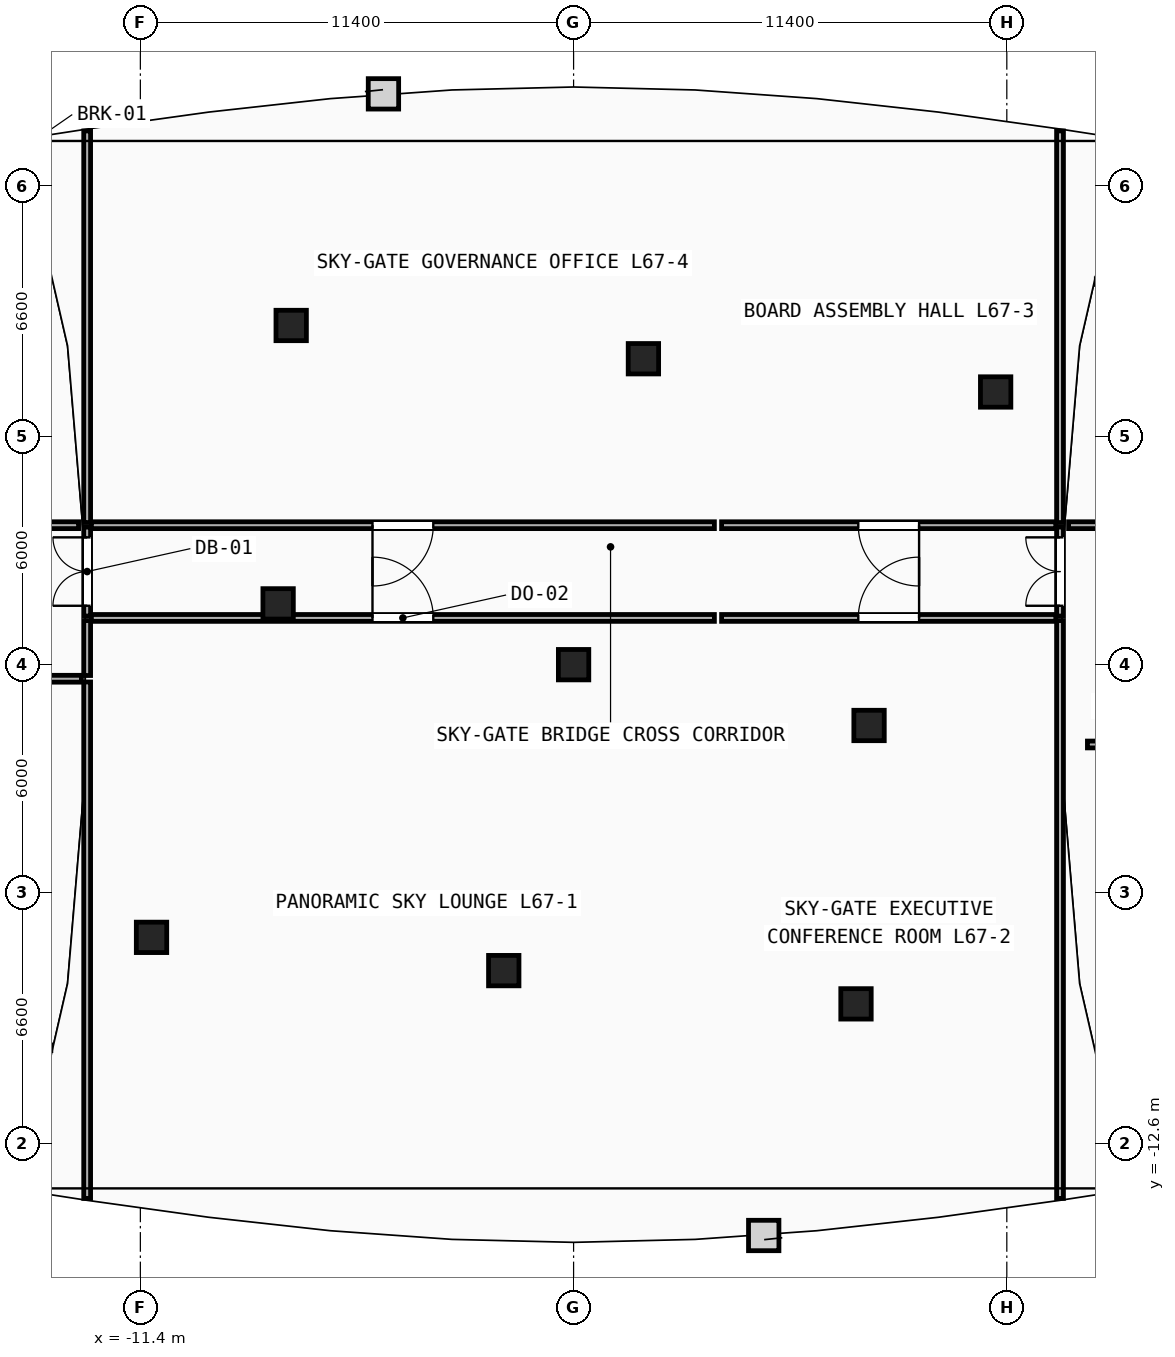
"""IFC4 building model, lengths in metres.
Left out: names, types, materials, properties, quantities, classifications, styles, units other than length and angle.
Written with IfcOpenShell. Run it as: python <this file> out.ifc"""

import sys

from ifc_helpers import new_model, si_unit, direction, frame, frame_2d, origin, origin_2d, place, context, subcontext, project, spatial, rectangle, extrude, element, fill, save


model = new_model("IFC4")
c1 = context("Model", 3, precision=1e-05, world=origin(), true_north=direction((0.0, 1.0)))
c2 = subcontext(c1, "Body", "Model", "MODEL_VIEW")
j1 = project(units=[si_unit("LENGTHUNIT", "METRE"), si_unit("PLANEANGLEUNIT", "RADIAN")], contexts=[c1])
p1 = place(None, origin())
s1 = spatial("IfcSite", under=j1, at=p1, CompositionType="ELEMENT")
p2 = place(p1, origin())
s2 = spatial("IfcBuilding", under=s1, at=p2, CompositionType="ELEMENT")
p3 = place(p2, frame((0.0, 0.0, 254.0)))
s3 = spatial("IfcBuildingStorey", under=s2, at=p3, CompositionType="ELEMENT", Elevation=254.0)
for number, where, z_axis, x_axis in (
    (1, (-11.106, -7.175, 0.0), (0.0, 0.0, 1.0), (1.0, 0.0, 0.0)),
    (2, (-1.837, -8.05, 0.0), (0.0, 0.0, 1.0), (1.0, 0.0, 0.0)),
    (3, (7.431, -8.925, 0.0), (0.0, 0.0, 1.0), (1.0, 0.0, 0.0)),
    (4, (-7.775, 1.6, 0.0), (0.0, 0.0, 1.0), (1.0, 0.0, 0.0)),
    (5, (0.0, 0.0, 0.0), (0.0, 0.0, 1.0), (1.0, 0.0, 0.0)),
    (6, (7.775, -1.6, 0.0), (0.0, 0.0, 1.0), (1.0, 0.0, 0.0)),
    (7, (-7.431, 8.925, 0.0), (0.0, 0.0, 1.0), (1.0, 0.0, 0.0)),
    (8, (1.837, 8.05, 0.0), (0.0, 0.0, 1.0), (1.0, 0.0, 0.0)),
    (9, (11.106, 7.175, 0.0), (0.0, 0.0, 1.0), (1.0, 0.0, 0.0)),
):
    element("IfcColumn", number, at=place(p3, frame(where, z_axis=z_axis, x_axis=x_axis)), inside=s3, PredefinedType="COLUMN", context=c2, shape_type="SweptSolid", body=[
        extrude(rectangle(XDim=0.8, YDim=0.8, at=origin_2d()), origin(), (0.0, 0.0, 1.0), 3.6),
    ])
p4 = place(p3, frame((-28.3, -0.37, 0.0), z_axis=(0.0, 0.0, 1.0), x_axis=(1.0, 0.0, 0.0)))
e10 = element("IfcWall", 10, at=p4, inside=s3, PredefinedType="PARTITIONING", context=c2, shape_type="SweptSolid", body=[
    extrude(rectangle(XDim=15.349, YDim=0.18, at=frame_2d((7.675, 0.0))), origin(), (0.0, 0.0, 1.0), 3.34),
])
p5 = place(p4, frame((7.175, 0.0, 0.0)))
e11 = element("IfcOpeningElement", 11, at=p5, cuts=e10, PredefinedType="OPENING", context=c2, shape_type="SweptSolid", body=[
    extrude(rectangle(XDim=1.0, YDim=2.15, at=frame_2d((0.5, 1.075))), frame((0.0, 0.1, 0.0), z_axis=(0.0, -1.0, 0.0), x_axis=(1.0, 0.0, 0.0)), (0.0, 0.0, 1.0), 0.2),
])
p6 = place(p3, frame((-13.026, 3.67, 0.0), z_axis=(0.0, 0.0, 1.0), x_axis=(-1.0, 0.0, 0.0)))
e12 = element("IfcWall", 12, at=p6, inside=s3, PredefinedType="PARTITIONING", context=c2, shape_type="SweptSolid", body=[
    extrude(rectangle(XDim=3.753, YDim=0.18, at=frame_2d((1.876, 0.0))), origin(), (0.0, 0.0, 1.0), 3.34),
])
p7 = place(p3, frame((13.521, -2.1, 0.0), z_axis=(0.0, 0.0, 1.0), x_axis=(1.0, 0.0, 0.0)))
e13 = element("IfcWall", 13, at=p7, inside=s3, PredefinedType="PARTITIONING", context=c2, shape_type="SweptSolid", body=[
    extrude(rectangle(XDim=7.398, YDim=0.18, at=frame_2d((3.699, 0.0))), origin(), (0.0, 0.0, 1.0), 3.34),
])
p8 = place(p3, frame((16.779, 3.67, 0.0), z_axis=(0.0, 0.0, 1.0), x_axis=(-1.0, 0.0, 0.0)))
e14 = element("IfcWall", 14, at=p8, inside=s3, PredefinedType="PARTITIONING", context=c2, shape_type="SweptSolid", body=[
    extrude(rectangle(XDim=3.753, YDim=0.18, at=frame_2d((1.876, 0.0))), origin(), (0.0, 0.0, 1.0), 3.34),
])
p9 = place(p3, frame((-12.688, 1.23, 0.0), z_axis=(0.0, 0.0, 1.0), x_axis=(1.0, 0.0, 0.0)))
e15 = element("IfcWall", 15, at=p9, inside=s3, PredefinedType="PARTITIONING", context=c2, shape_type="SweptSolid", body=[
    extrude(rectangle(XDim=16.394, YDim=0.18, at=frame_2d((8.197, 0.0))), origin(), (0.0, 0.0, 1.0), 2.663),
])
p10 = place(p9, frame((7.397, 0.0, 0.0)))
e16 = element("IfcOpeningElement", 16, at=p10, cuts=e15, PredefinedType="OPENING", context=c2, shape_type="SweptSolid", body=[
    extrude(rectangle(XDim=1.6, YDim=2.2, at=frame_2d((0.8, 1.1))), frame((0.0, 0.1, 0.0), z_axis=(0.0, -1.0, 0.0), x_axis=(1.0, 0.0, 0.0)), (0.0, 0.0, 1.0), 0.2),
])
p11 = place(p3, frame((3.895, 1.23, 0.0), z_axis=(0.0, 0.0, 1.0), x_axis=(1.0, 0.0, 0.0)))
e17 = element("IfcWall", 17, at=p11, inside=s3, PredefinedType="PARTITIONING", context=c2, shape_type="SweptSolid", body=[
    extrude(rectangle(XDim=8.793, YDim=0.18, at=frame_2d((4.397, 0.0))), origin(), (0.0, 0.0, 1.0), 3.34),
])
p12 = place(p11, frame((3.597, 0.0, 0.0)))
e18 = element("IfcOpeningElement", 18, at=p12, cuts=e17, PredefinedType="OPENING", context=c2, shape_type="SweptSolid", body=[
    extrude(rectangle(XDim=1.6, YDim=2.2, at=frame_2d((0.8, 1.1))), frame((0.0, 0.1, 0.0), z_axis=(0.0, -1.0, 0.0), x_axis=(1.0, 0.0, 0.0)), (0.0, 0.0, 1.0), 0.2),
])
p13 = place(p3, frame((12.688, 3.67, 0.0), z_axis=(0.0, 0.0, 1.0), x_axis=(-1.0, 0.0, 0.0)))
e19 = element("IfcWall", 19, at=p13, inside=s3, PredefinedType="PARTITIONING", context=c2, shape_type="SweptSolid", body=[
    extrude(rectangle(XDim=8.793, YDim=0.18, at=frame_2d((4.397, 0.0))), origin(), (0.0, 0.0, 1.0), 3.34),
])
p14 = place(p13, frame((3.597, 0.0, 0.0)))
e20 = element("IfcOpeningElement", 20, at=p14, cuts=e19, PredefinedType="OPENING", context=c2, shape_type="SweptSolid", body=[
    extrude(rectangle(XDim=1.6, YDim=2.2, at=frame_2d((0.8, 1.1))), frame((0.0, 0.1, 0.0), z_axis=(0.0, -1.0, 0.0), x_axis=(1.0, 0.0, 0.0)), (0.0, 0.0, 1.0), 0.2),
])
p15 = place(p3, frame((3.705, 3.67, 0.0), z_axis=(0.0, 0.0, 1.0), x_axis=(-1.0, 0.0, 0.0)))
e21 = element("IfcWall", 21, at=p15, inside=s3, PredefinedType="PARTITIONING", context=c2, shape_type="SweptSolid", body=[
    extrude(rectangle(XDim=16.394, YDim=0.18, at=frame_2d((8.197, 0.0))), origin(), (0.0, 0.0, 1.0), 3.34),
])
p16 = place(p15, frame((7.397, 0.0, 0.0)))
e22 = element("IfcOpeningElement", 22, at=p16, cuts=e21, PredefinedType="OPENING", context=c2, shape_type="SweptSolid", body=[
    extrude(rectangle(XDim=1.6, YDim=2.2, at=frame_2d((0.8, 1.1))), frame((0.0, 0.1, 0.0), z_axis=(0.0, -1.0, 0.0), x_axis=(1.0, 0.0, 0.0)), (0.0, 0.0, 1.0), 0.2),
])
p17 = place(p3, frame((-12.8, -14.044, 0.0), z_axis=(0.0, 0.0, 1.0), x_axis=(0.0, 1.0, 0.0)))
e23 = element("IfcWall", 23, at=p17, inside=s3, PredefinedType="PARTITIONING", context=c2, shape_type="SweptSolid", body=[
    extrude(rectangle(XDim=13.589, YDim=0.18, at=frame_2d((6.794, 0.0))), origin(), (0.0, 0.0, 1.0), 3.34),
])
p18 = place(p3, frame((-12.8, -0.285, 0.0), z_axis=(0.0, 0.0, 1.0), x_axis=(0.0, 1.0, 0.0)))
e24 = element("IfcWall", 24, at=p18, inside=s3, PredefinedType="PARTITIONING", context=c2, shape_type="SweptSolid", body=[
    extrude(rectangle(XDim=1.445, YDim=0.18, at=frame_2d((0.722, 0.0))), origin(), (0.0, 0.0, 1.0), 3.34),
])
p19 = place(p3, frame((-12.8, 3.74, 0.0), z_axis=(0.0, 0.0, 1.0), x_axis=(0.0, 1.0, 0.0)))
e25 = element("IfcWall", 25, at=p19, inside=s3, PredefinedType="PARTITIONING", context=c2, shape_type="SweptSolid", body=[
    extrude(rectangle(XDim=10.304, YDim=0.18, at=frame_2d((5.152, 0.0))), origin(), (0.0, 0.0, 1.0), 3.34),
])
p20 = place(p3, frame((-12.8, 1.28, 0.0), z_axis=(0.0, 0.0, 1.0), x_axis=(0.0, 1.0, 0.0)))
e26 = element("IfcWall", 26, at=p20, inside=s3, PredefinedType="PARTITIONING", context=c2, shape_type="SweptSolid", body=[
    extrude(rectangle(XDim=2.34, YDim=0.18, at=frame_2d((1.17, 0.0))), origin(), (0.0, 0.0, 1.0), 3.34),
])
p21 = place(p20, frame((0.27, 0.0, 0.0)))
e27 = element("IfcOpeningElement", 27, at=p21, cuts=e26, PredefinedType="OPENING", context=c2, shape_type="SweptSolid", body=[
    extrude(rectangle(XDim=1.8, YDim=2.25, at=frame_2d((0.9, 1.125))), frame((0.0, 0.1, 0.0), z_axis=(0.0, -1.0, 0.0), x_axis=(1.0, 0.0, 0.0)), (0.0, 0.0, 1.0), 0.2),
])
p22 = place(p3, frame((12.8, -14.044, 0.0), z_axis=(0.0, 0.0, 1.0), x_axis=(0.0, 1.0, 0.0)))
e28 = element("IfcWall", 28, at=p22, inside=s3, PredefinedType="PARTITIONING", context=c2, shape_type="SweptSolid", body=[
    extrude(rectangle(XDim=15.204, YDim=0.18, at=frame_2d((7.602, 0.0))), origin(), (0.0, 0.0, 1.0), 3.34),
])
p23 = place(p3, frame((12.8, 3.74, 0.0), z_axis=(0.0, 0.0, 1.0), x_axis=(0.0, 1.0, 0.0)))
e29 = element("IfcWall", 29, at=p23, inside=s3, PredefinedType="PARTITIONING", context=c2, shape_type="SweptSolid", body=[
    extrude(rectangle(XDim=10.304, YDim=0.18, at=frame_2d((5.152, 0.0))), origin(), (0.0, 0.0, 1.0), 3.34),
])
p24 = place(p3, frame((12.8, 1.28, 0.0), z_axis=(0.0, 0.0, 1.0), x_axis=(0.0, 1.0, 0.0)))
e30 = element("IfcWall", 30, at=p24, inside=s3, PredefinedType="PARTITIONING", context=c2, shape_type="SweptSolid", body=[
    extrude(rectangle(XDim=2.34, YDim=0.18, at=frame_2d((1.17, 0.0))), origin(), (0.0, 0.0, 1.0), 3.34),
])
p25 = place(p24, frame((0.27, 0.0, 0.0)))
e31 = element("IfcOpeningElement", 31, at=p25, cuts=e30, PredefinedType="OPENING", context=c2, shape_type="SweptSolid", body=[
    extrude(rectangle(XDim=1.8, YDim=2.25, at=frame_2d((0.9, 1.125))), frame((0.0, 0.1, 0.0), z_axis=(0.0, -1.0, 0.0), x_axis=(1.0, 0.0, 0.0)), (0.0, 0.0, 1.0), 0.2),
])
p26 = place(p10, origin())
e32 = element("IfcDoor", 32, at=p26, inside=s3, OperationType="SINGLE_SWING_LEFT", PredefinedType="DOOR", context=c2, shape_type="SweptSolid", body=[
    extrude(rectangle(XDim=1.6, YDim=2.2, at=frame_2d((0.8, 1.1))), frame((0.0, 0.025, 0.0), z_axis=(0.0, -1.0, 0.0), x_axis=(1.0, 0.0, 0.0)), (0.0, 0.0, 1.0), 0.05),
])
fill(e16, e32)
p27 = place(p16, origin())
e33 = element("IfcDoor", 33, at=p27, inside=s3, OperationType="SINGLE_SWING_RIGHT", PredefinedType="DOOR", context=c2, shape_type="SweptSolid", body=[
    extrude(rectangle(XDim=1.6, YDim=2.2, at=frame_2d((0.8, 1.1))), frame((0.0, 0.025, 0.0), z_axis=(0.0, -1.0, 0.0), x_axis=(1.0, 0.0, 0.0)), (0.0, 0.0, 1.0), 0.05),
])
fill(e22, e33)
p28 = place(p12, origin())
e34 = element("IfcDoor", 34, at=p28, inside=s3, OperationType="SINGLE_SWING_RIGHT", PredefinedType="DOOR", context=c2, shape_type="SweptSolid", body=[
    extrude(rectangle(XDim=1.6, YDim=2.2, at=frame_2d((0.8, 1.1))), frame((0.0, 0.025, 0.0), z_axis=(0.0, -1.0, 0.0), x_axis=(1.0, 0.0, 0.0)), (0.0, 0.0, 1.0), 0.05),
])
fill(e18, e34)
p29 = place(p14, origin())
e35 = element("IfcDoor", 35, at=p29, inside=s3, OperationType="SINGLE_SWING_LEFT", PredefinedType="DOOR", context=c2, shape_type="SweptSolid", body=[
    extrude(rectangle(XDim=1.6, YDim=2.2, at=frame_2d((0.8, 1.1))), frame((0.0, 0.025, 0.0), z_axis=(0.0, -1.0, 0.0), x_axis=(1.0, 0.0, 0.0)), (0.0, 0.0, 1.0), 0.05),
])
fill(e20, e35)
p30 = place(p21, origin())
e36 = element("IfcDoor", 36, at=p30, inside=s3, OperationType="DOUBLE_DOOR_SINGLE_SWING", PredefinedType="DOOR", context=c2, shape_type="SweptSolid", body=[
    extrude(rectangle(XDim=1.8, YDim=2.25, at=frame_2d((0.9, 1.125))), frame((0.0, 0.025, 0.0), z_axis=(0.0, -1.0, 0.0), x_axis=(1.0, 0.0, 0.0)), (0.0, 0.0, 1.0), 0.05),
])
fill(e27, e36)
p31 = place(p25, origin())
e37 = element("IfcDoor", 37, at=p31, inside=s3, OperationType="DOUBLE_DOOR_SINGLE_SWING", PredefinedType="DOOR", context=c2, shape_type="SweptSolid", body=[
    extrude(rectangle(XDim=1.8, YDim=2.25, at=frame_2d((0.9, 1.125))), frame((0.0, 0.025, 0.0), z_axis=(0.0, -1.0, 0.0), x_axis=(1.0, 0.0, 0.0)), (0.0, 0.0, 1.0), 0.05),
])
fill(e31, e37)
save(model, sys.argv[1])
